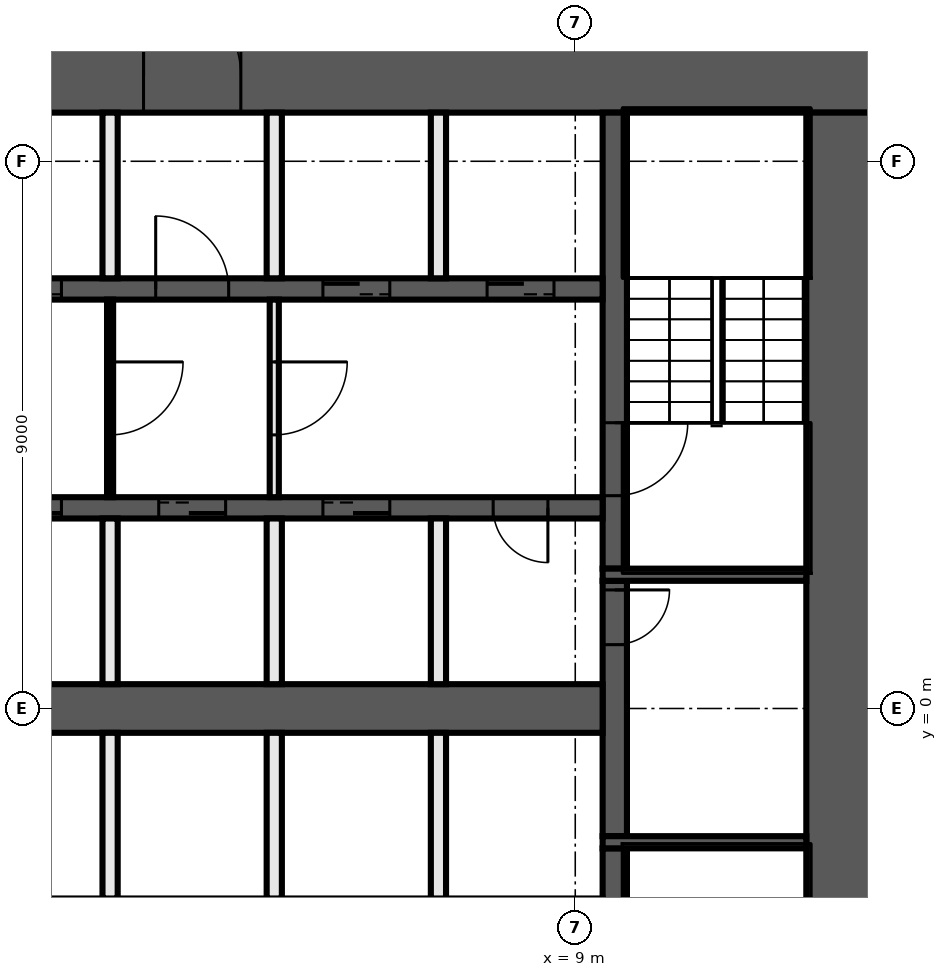
"""IFC4 building model, lengths in metres.
Left out: names, types, materials, properties, quantities, classifications, styles, units other than length and angle.
Written with IfcOpenShell. Run it as: python <this file> out.ifc"""

import sys

from ifc_helpers import new_model, si_unit, direction, frame, frame_2d, origin, place, context, subcontext, project, spatial, rectangle, extrude, element, fill, save


model = new_model("IFC4")
c1 = context("Model", 3, precision=1e-05, world=origin(), true_north=direction((0.0, 1.0)))
c2 = subcontext(c1, "Body", "Model", "MODEL_VIEW")
j1 = project(units=[si_unit("LENGTHUNIT", "METRE"), si_unit("PLANEANGLEUNIT", "RADIAN")], contexts=[c1])
p1 = place(None, origin())
s1 = spatial("IfcSite", under=j1, at=p1, CompositionType="ELEMENT")
p2 = place(p1, origin())
s2 = spatial("IfcBuilding", under=s1, at=p2, CompositionType="ELEMENT")
p3 = place(p2, frame((0.0, 0.0, 19.0)))
s3 = spatial("IfcBuildingStorey", under=s2, at=p3, CompositionType="ELEMENT", Elevation=19.0)
p4 = place(p3, frame((-14.0, 10.4, 0.0), z_axis=(0.0, 0.0, 1.0), x_axis=(1.0, 0.0, 0.0)))
e1 = element("IfcWall", 1, at=p4, inside=s3, PredefinedType="SHEAR", context=c2, shape_type="SweptSolid", body=[
    extrude(rectangle(XDim=28.0, YDim=1.2, at=frame_2d((14.0, 0.0))), origin(), (0.0, 0.0, 1.0), 7.55),
])
p5 = place(p4, frame((15.9, 0.0, 0.0)))
e2 = element("IfcOpeningElement", 2, at=p5, cuts=e1, PredefinedType="OPENING", context=c2, shape_type="SweptSolid", body=[
    extrude(rectangle(XDim=1.6, YDim=2.1, at=frame_2d((0.8, 1.05))), frame((0.0, 0.61, 0.0), z_axis=(0.0, -1.0, 0.0), x_axis=(1.0, 0.0, 0.0)), (0.0, 0.0, 1.0), 1.22),
])
p6 = place(p3, frame((13.4, 9.8, 0.0), z_axis=(0.0, 0.0, 1.0), x_axis=(0.0, -1.0, 0.0)))
e3 = element("IfcWall", 3, at=p6, inside=s3, PredefinedType="SHEAR", context=c2, shape_type="SweptSolid", body=[
    extrude(rectangle(XDim=19.6, YDim=1.2, at=frame_2d((9.8, 0.0))), origin(), (0.0, 0.0, 1.0), 7.55),
])
p7 = place(p3, frame((9.65, -2.3, 0.0), z_axis=(0.0, 0.0, 1.0), x_axis=(0.0, -1.0, 0.0)))
e4 = element("IfcWall", 4, at=p7, inside=s3, PredefinedType="SHEAR", context=c2, shape_type="SweptSolid", body=[
    extrude(rectangle(XDim=7.5, YDim=0.4, at=frame_2d((3.75, 0.0))), origin(), (0.0, 0.0, 1.0), 7.55),
])
p8 = place(p7, frame((1.2, 0.0, 0.0)))
e5 = element("IfcOpeningElement", 5, at=p8, cuts=e4, PredefinedType="OPENING", context=c2, shape_type="SweptSolid", body=[
    extrude(rectangle(XDim=1.2, YDim=2.1, at=frame_2d((0.6, 1.05))), frame((0.0, 0.21, 0.0), z_axis=(0.0, -1.0, 0.0), x_axis=(1.0, 0.0, 0.0)), (0.0, 0.0, 1.0), 0.42),
])
p9 = place(p3, frame((9.65, 2.1, 0.0), z_axis=(0.0, 0.0, 1.0), x_axis=(0.0, -1.0, 0.0)))
e6 = element("IfcWall", 6, at=p9, inside=s3, PredefinedType="SHEAR", context=c2, shape_type="SweptSolid", body=[
    extrude(rectangle(XDim=4.2, YDim=0.4, at=frame_2d((2.1, 0.0))), origin(), (0.0, 0.0, 1.0), 7.55),
])
p10 = place(p9, frame((0.15, 0.0, 0.0)))
e7 = element("IfcOpeningElement", 7, at=p10, cuts=e6, PredefinedType="OPENING", context=c2, shape_type="SweptSolid", body=[
    extrude(rectangle(XDim=0.9, YDim=2.1, at=frame_2d((0.45, 1.05))), frame((0.0, 0.21, 0.0), z_axis=(0.0, -1.0, 0.0), x_axis=(1.0, 0.0, 0.0)), (0.0, 0.0, 1.0), 0.42),
])
p11 = place(p3, frame((9.65, 9.8, 0.0), z_axis=(0.0, 0.0, 1.0), x_axis=(0.0, -1.0, 0.0)))
e8 = element("IfcWall", 8, at=p11, inside=s3, PredefinedType="SHEAR", context=c2, shape_type="SweptSolid", body=[
    extrude(rectangle(XDim=7.5, YDim=0.4, at=frame_2d((3.75, 0.0))), origin(), (0.0, 0.0, 1.0), 7.55),
])
p12 = place(p11, frame((5.1, 0.0, 0.0)))
e9 = element("IfcOpeningElement", 9, at=p12, cuts=e8, PredefinedType="OPENING", context=c2, shape_type="SweptSolid", body=[
    extrude(rectangle(XDim=1.2, YDim=2.1, at=frame_2d((0.6, 1.05))), frame((0.0, 0.21, 0.0), z_axis=(0.0, -1.0, 0.0), x_axis=(1.0, 0.0, 0.0)), (0.0, 0.0, 1.0), 0.42),
])
for number, where, z_axis, x_axis in (
    (10, (9.45, 2.2, 0.0), (0.0, 0.0, 1.0), (1.0, 0.0, 0.0)),
    (11, (9.45, -2.2, 0.0), (0.0, 0.0, 1.0), (1.0, 0.0, 0.0)),
):
    element("IfcWall", number, at=place(p3, frame(where, z_axis=z_axis, x_axis=x_axis)), inside=s3, PredefinedType="SHEAR", context=c2, shape_type="SweptSolid", body=[
        extrude(rectangle(XDim=3.35, YDim=0.2, at=frame_2d((1.675, 0.0))), origin(), (0.0, 0.0, 1.0), 7.55),
    ])
p13 = place(p3, frame((-9.45, 6.9, 0.0), z_axis=(0.0, 0.0, 1.0), x_axis=(1.0, 0.0, 0.0)))
e12 = element("IfcWall", 12, at=p13, inside=s3, PredefinedType="SHEAR", context=c2, shape_type="SweptSolid", body=[
    extrude(rectangle(XDim=18.9, YDim=0.35, at=frame_2d((9.45, 0.0))), origin(), (0.0, 0.0, 1.0), 7.55),
])
p14 = place(p13, frame((0.8, 0.0, 0.0)))
e13 = element("IfcOpeningElement", 13, at=p14, cuts=e12, PredefinedType="OPENING", context=c2, shape_type="SweptSolid", body=[
    extrude(rectangle(XDim=1.1, YDim=2.1, at=frame_2d((0.55, 1.05))), frame((0.0, 0.185, 0.0), z_axis=(0.0, -1.0, 0.0), x_axis=(1.0, 0.0, 0.0)), (0.0, 0.0, 1.0), 0.37),
])
p15 = place(p13, frame((3.5, 0.0, 0.0)))
e14 = element("IfcOpeningElement", 14, at=p15, cuts=e12, PredefinedType="OPENING", context=c2, shape_type="SweptSolid", body=[
    extrude(rectangle(XDim=1.1, YDim=2.1, at=frame_2d((0.55, 1.05))), frame((0.0, 0.185, 0.0), z_axis=(0.0, -1.0, 0.0), x_axis=(1.0, 0.0, 0.0)), (0.0, 0.0, 1.0), 0.37),
])
p16 = place(p13, frame((6.2, 0.0, 0.0)))
e15 = element("IfcOpeningElement", 15, at=p16, cuts=e12, PredefinedType="OPENING", context=c2, shape_type="SweptSolid", body=[
    extrude(rectangle(XDim=1.1, YDim=2.1, at=frame_2d((0.55, 1.05))), frame((0.0, 0.185, 0.0), z_axis=(0.0, -1.0, 0.0), x_axis=(1.0, 0.0, 0.0)), (0.0, 0.0, 1.0), 0.37),
])
p17 = place(p13, frame((8.9, 0.0, 0.0)))
e16 = element("IfcOpeningElement", 16, at=p17, cuts=e12, PredefinedType="OPENING", context=c2, shape_type="SweptSolid", body=[
    extrude(rectangle(XDim=1.1, YDim=2.1, at=frame_2d((0.55, 1.05))), frame((0.0, 0.185, 0.0), z_axis=(0.0, -1.0, 0.0), x_axis=(1.0, 0.0, 0.0)), (0.0, 0.0, 1.0), 0.37),
])
p18 = place(p13, frame((11.55, 0.0, 0.0)))
e17 = element("IfcOpeningElement", 17, at=p18, cuts=e12, PredefinedType="OPENING", context=c2, shape_type="SweptSolid", body=[
    extrude(rectangle(XDim=1.2, YDim=2.1, at=frame_2d((0.6, 1.05))), frame((0.0, 0.185, 0.0), z_axis=(0.0, -1.0, 0.0), x_axis=(1.0, 0.0, 0.0)), (0.0, 0.0, 1.0), 0.37),
])
p19 = place(p13, frame((14.3, 0.0, 0.0)))
e18 = element("IfcOpeningElement", 18, at=p19, cuts=e12, PredefinedType="OPENING", context=c2, shape_type="SweptSolid", body=[
    extrude(rectangle(XDim=1.1, YDim=2.1, at=frame_2d((0.55, 1.05))), frame((0.0, 0.185, 0.0), z_axis=(0.0, -1.0, 0.0), x_axis=(1.0, 0.0, 0.0)), (0.0, 0.0, 1.0), 0.37),
])
p20 = place(p13, frame((17.0, 0.0, 0.0)))
e19 = element("IfcOpeningElement", 19, at=p20, cuts=e12, PredefinedType="OPENING", context=c2, shape_type="SweptSolid", body=[
    extrude(rectangle(XDim=1.1, YDim=2.1, at=frame_2d((0.55, 1.05))), frame((0.0, 0.185, 0.0), z_axis=(0.0, -1.0, 0.0), x_axis=(1.0, 0.0, 0.0)), (0.0, 0.0, 1.0), 0.37),
])
p21 = place(p3, frame((9.45, 3.3, 0.0), z_axis=(0.0, 0.0, 1.0), x_axis=(-1.0, 0.0, 0.0)))
e20 = element("IfcWall", 20, at=p21, inside=s3, PredefinedType="SHEAR", context=c2, shape_type="SweptSolid", body=[
    extrude(rectangle(XDim=18.9, YDim=0.35, at=frame_2d((9.45, 0.0))), origin(), (0.0, 0.0, 1.0), 7.55),
])
p22 = place(p21, frame((17.0, 0.0, 0.0)))
e21 = element("IfcOpeningElement", 21, at=p22, cuts=e20, PredefinedType="OPENING", context=c2, shape_type="SweptSolid", body=[
    extrude(rectangle(XDim=1.1, YDim=2.1, at=frame_2d((0.55, 1.05))), frame((0.0, 0.185, 0.0), z_axis=(0.0, -1.0, 0.0), x_axis=(1.0, 0.0, 0.0)), (0.0, 0.0, 1.0), 0.37),
])
p23 = place(p21, frame((14.3, 0.0, 0.0)))
e22 = element("IfcOpeningElement", 22, at=p23, cuts=e20, PredefinedType="OPENING", context=c2, shape_type="SweptSolid", body=[
    extrude(rectangle(XDim=1.1, YDim=2.1, at=frame_2d((0.55, 1.05))), frame((0.0, 0.185, 0.0), z_axis=(0.0, -1.0, 0.0), x_axis=(1.0, 0.0, 0.0)), (0.0, 0.0, 1.0), 0.37),
])
p24 = place(p21, frame((11.6, 0.0, 0.0)))
e23 = element("IfcOpeningElement", 23, at=p24, cuts=e20, PredefinedType="OPENING", context=c2, shape_type="SweptSolid", body=[
    extrude(rectangle(XDim=1.1, YDim=2.1, at=frame_2d((0.55, 1.05))), frame((0.0, 0.185, 0.0), z_axis=(0.0, -1.0, 0.0), x_axis=(1.0, 0.0, 0.0)), (0.0, 0.0, 1.0), 0.37),
])
p25 = place(p21, frame((8.9, 0.0, 0.0)))
e24 = element("IfcOpeningElement", 24, at=p25, cuts=e20, PredefinedType="OPENING", context=c2, shape_type="SweptSolid", body=[
    extrude(rectangle(XDim=1.1, YDim=2.1, at=frame_2d((0.55, 1.05))), frame((0.0, 0.185, 0.0), z_axis=(0.0, -1.0, 0.0), x_axis=(1.0, 0.0, 0.0)), (0.0, 0.0, 1.0), 0.37),
])
p26 = place(p21, frame((6.2, 0.0, 0.0)))
e25 = element("IfcOpeningElement", 25, at=p26, cuts=e20, PredefinedType="OPENING", context=c2, shape_type="SweptSolid", body=[
    extrude(rectangle(XDim=1.1, YDim=2.1, at=frame_2d((0.55, 1.05))), frame((0.0, 0.185, 0.0), z_axis=(0.0, -1.0, 0.0), x_axis=(1.0, 0.0, 0.0)), (0.0, 0.0, 1.0), 0.37),
])
p27 = place(p21, frame((3.5, 0.0, 0.0)))
e26 = element("IfcOpeningElement", 26, at=p27, cuts=e20, PredefinedType="OPENING", context=c2, shape_type="SweptSolid", body=[
    extrude(rectangle(XDim=1.1, YDim=2.1, at=frame_2d((0.55, 1.05))), frame((0.0, 0.185, 0.0), z_axis=(0.0, -1.0, 0.0), x_axis=(1.0, 0.0, 0.0)), (0.0, 0.0, 1.0), 0.37),
])
p28 = place(p21, frame((0.9, 0.0, 0.0)))
e27 = element("IfcOpeningElement", 27, at=p28, cuts=e20, PredefinedType="OPENING", context=c2, shape_type="SweptSolid", body=[
    extrude(rectangle(XDim=0.9, YDim=2.1, at=frame_2d((0.45, 1.05))), frame((0.0, 0.185, 0.0), z_axis=(0.0, -1.0, 0.0), x_axis=(1.0, 0.0, 0.0)), (0.0, 0.0, 1.0), 0.37),
])
p29 = place(p3, frame((-9.45, 0.0, 0.0), z_axis=(0.0, 0.0, 1.0), x_axis=(1.0, 0.0, 0.0)))
e28 = element("IfcWall", 28, at=p29, inside=s3, PredefinedType="SHEAR", context=c2, shape_type="SweptSolid", body=[
    extrude(rectangle(XDim=18.9, YDim=0.8, at=frame_2d((9.45, 0.0))), origin(), (0.0, 0.0, 1.0), 7.55),
])
for number, where, z_axis, x_axis in (
    (29, (6.75, -3.125, 0.0), (0.0, 0.0, 1.0), (0.0, 1.0, 0.0)),
    (30, (6.75, 0.4, 0.0), (0.0, 0.0, 1.0), (0.0, 1.0, 0.0)),
    (31, (6.75, 7.075, 0.0), (0.0, 0.0, 1.0), (0.0, 1.0, 0.0)),
):
    element("IfcWall", number, at=place(p3, frame(where, z_axis=z_axis, x_axis=x_axis)), inside=s3, PredefinedType="SOLIDWALL", context=c2, shape_type="SweptSolid", body=[
        extrude(rectangle(XDim=2.725, YDim=0.25, at=frame_2d((1.363, 0.0))), origin(), (0.0, 0.0, 1.0), 7.55),
    ])
p30 = place(p3, frame((4.05, 6.725, 0.0), z_axis=(0.0, 0.0, 1.0), x_axis=(0.0, -1.0, 0.0)))
e32 = element("IfcWall", 32, at=p30, inside=s3, PredefinedType="PARTITIONING", context=c2, shape_type="SweptSolid", body=[
    extrude(rectangle(XDim=3.25, YDim=0.15, at=frame_2d((1.625, 0.0))), origin(), (0.0, 0.0, 1.0), 7.55),
])
p31 = place(p30, frame((1.025, 0.0, 0.0)))
e33 = element("IfcOpeningElement", 33, at=p31, cuts=e32, PredefinedType="OPENING", context=c2, shape_type="SweptSolid", body=[
    extrude(rectangle(XDim=1.2, YDim=2.1, at=frame_2d((0.6, 1.05))), frame((0.0, 0.085, 0.0), z_axis=(0.0, -1.0, 0.0), x_axis=(1.0, 0.0, 0.0)), (0.0, 0.0, 1.0), 0.17),
])
for number, where, z_axis, x_axis in (
    (34, (4.05, -3.125, 0.0), (0.0, 0.0, 1.0), (0.0, 1.0, 0.0)),
    (35, (4.05, 0.4, 0.0), (0.0, 0.0, 1.0), (0.0, 1.0, 0.0)),
    (36, (4.05, 7.075, 0.0), (0.0, 0.0, 1.0), (0.0, 1.0, 0.0)),
):
    element("IfcWall", number, at=place(p3, frame(where, z_axis=z_axis, x_axis=x_axis)), inside=s3, PredefinedType="SOLIDWALL", context=c2, shape_type="SweptSolid", body=[
        extrude(rectangle(XDim=2.725, YDim=0.25, at=frame_2d((1.363, 0.0))), origin(), (0.0, 0.0, 1.0), 7.55),
    ])
p32 = place(p3, frame((1.35, 6.725, 0.0), z_axis=(0.0, 0.0, 1.0), x_axis=(0.0, -1.0, 0.0)))
e37 = element("IfcWall", 37, at=p32, inside=s3, PredefinedType="PARTITIONING", context=c2, shape_type="SweptSolid", body=[
    extrude(rectangle(XDim=3.25, YDim=0.1, at=frame_2d((1.625, 0.0))), origin(), (0.0, 0.0, 1.0), 7.55),
])
p33 = place(p32, frame((1.025, 0.0, 0.0)))
e38 = element("IfcOpeningElement", 38, at=p33, cuts=e37, PredefinedType="OPENING", context=c2, shape_type="SweptSolid", body=[
    extrude(rectangle(XDim=1.2, YDim=2.1, at=frame_2d((0.6, 1.05))), frame((0.0, 0.06, 0.0), z_axis=(0.0, -1.0, 0.0), x_axis=(1.0, 0.0, 0.0)), (0.0, 0.0, 1.0), 0.12),
])
for number, where, z_axis, x_axis in (
    (39, (1.35, -3.125, 0.0), (0.0, 0.0, 1.0), (0.0, 1.0, 0.0)),
    (40, (1.35, 0.4, 0.0), (0.0, 0.0, 1.0), (0.0, 1.0, 0.0)),
    (41, (1.35, 7.075, 0.0), (0.0, 0.0, 1.0), (0.0, 1.0, 0.0)),
):
    element("IfcWall", number, at=place(p3, frame(where, z_axis=z_axis, x_axis=x_axis)), inside=s3, PredefinedType="SOLIDWALL", context=c2, shape_type="SweptSolid", body=[
        extrude(rectangle(XDim=2.725, YDim=0.25, at=frame_2d((1.363, 0.0))), origin(), (0.0, 0.0, 1.0), 7.55),
    ])
p34 = place(p10, origin())
e42 = element("IfcDoor", 42, at=p34, inside=s3, OperationType="SINGLE_SWING_RIGHT", PredefinedType="DOOR", context=c2, shape_type="SweptSolid", body=[
    extrude(rectangle(XDim=0.9, YDim=2.1, at=frame_2d((0.45, 1.05))), frame((0.0, 0.025, 0.0), z_axis=(0.0, -1.0, 0.0), x_axis=(1.0, 0.0, 0.0)), (0.0, 0.0, 1.0), 0.05),
])
fill(e7, e42)
p35 = place(p17, origin())
e43 = element("IfcDoor", 43, at=p35, inside=s3, OperationType="DOUBLE_DOOR_SLIDING", PredefinedType="DOOR", context=c2, shape_type="SweptSolid", body=[
    extrude(rectangle(XDim=1.1, YDim=2.1, at=frame_2d((0.55, 1.05))), frame((0.0, 0.025, 0.0), z_axis=(0.0, -1.0, 0.0), x_axis=(1.0, 0.0, 0.0)), (0.0, 0.0, 1.0), 0.05),
])
fill(e16, e43)
p36 = place(p5, origin())
e44 = element("IfcDoor", 44, at=p36, inside=s3, OperationType="DOUBLE_DOOR_SINGLE_SWING", PredefinedType="DOOR", context=c2, shape_type="SweptSolid", body=[
    extrude(rectangle(XDim=1.6, YDim=2.1, at=frame_2d((0.8, 1.05))), frame((0.0, 0.025, 0.0), z_axis=(0.0, -1.0, 0.0), x_axis=(1.0, 0.0, 0.0)), (0.0, 0.0, 1.0), 0.05),
])
fill(e2, e44)
p37 = place(p18, origin())
e45 = element("IfcDoor", 45, at=p37, inside=s3, OperationType="SINGLE_SWING_LEFT", PredefinedType="DOOR", context=c2, shape_type="SweptSolid", body=[
    extrude(rectangle(XDim=1.2, YDim=2.1, at=frame_2d((0.6, 1.05))), frame((0.0, 0.025, 0.0), z_axis=(0.0, -1.0, 0.0), x_axis=(1.0, 0.0, 0.0)), (0.0, 0.0, 1.0), 0.05),
])
fill(e17, e45)
p38 = place(p19, origin())
e46 = element("IfcDoor", 46, at=p38, inside=s3, OperationType="DOUBLE_DOOR_SLIDING", PredefinedType="DOOR", context=c2, shape_type="SweptSolid", body=[
    extrude(rectangle(XDim=1.1, YDim=2.1, at=frame_2d((0.55, 1.05))), frame((0.0, 0.025, 0.0), z_axis=(0.0, -1.0, 0.0), x_axis=(1.0, 0.0, 0.0)), (0.0, 0.0, 1.0), 0.05),
])
fill(e18, e46)
p39 = place(p20, origin())
e47 = element("IfcDoor", 47, at=p39, inside=s3, OperationType="DOUBLE_DOOR_SLIDING", PredefinedType="DOOR", context=c2, shape_type="SweptSolid", body=[
    extrude(rectangle(XDim=1.1, YDim=2.1, at=frame_2d((0.55, 1.05))), frame((0.0, 0.025, 0.0), z_axis=(0.0, -1.0, 0.0), x_axis=(1.0, 0.0, 0.0)), (0.0, 0.0, 1.0), 0.05),
])
fill(e19, e47)
p40 = place(p25, origin())
e48 = element("IfcDoor", 48, at=p40, inside=s3, OperationType="DOUBLE_DOOR_SLIDING", PredefinedType="DOOR", context=c2, shape_type="SweptSolid", body=[
    extrude(rectangle(XDim=1.1, YDim=2.1, at=frame_2d((0.55, 1.05))), frame((0.0, 0.025, 0.0), z_axis=(0.0, -1.0, 0.0), x_axis=(1.0, 0.0, 0.0)), (0.0, 0.0, 1.0), 0.05),
])
fill(e24, e48)
p41 = place(p26, origin())
e49 = element("IfcDoor", 49, at=p41, inside=s3, OperationType="DOUBLE_DOOR_SLIDING", PredefinedType="DOOR", context=c2, shape_type="SweptSolid", body=[
    extrude(rectangle(XDim=1.1, YDim=2.1, at=frame_2d((0.55, 1.05))), frame((0.0, 0.025, 0.0), z_axis=(0.0, -1.0, 0.0), x_axis=(1.0, 0.0, 0.0)), (0.0, 0.0, 1.0), 0.05),
])
fill(e25, e49)
p42 = place(p27, origin())
e50 = element("IfcDoor", 50, at=p42, inside=s3, OperationType="DOUBLE_DOOR_SLIDING", PredefinedType="DOOR", context=c2, shape_type="SweptSolid", body=[
    extrude(rectangle(XDim=1.1, YDim=2.1, at=frame_2d((0.55, 1.05))), frame((0.0, 0.025, 0.0), z_axis=(0.0, -1.0, 0.0), x_axis=(1.0, 0.0, 0.0)), (0.0, 0.0, 1.0), 0.05),
])
fill(e26, e50)
p43 = place(p28, origin())
e51 = element("IfcDoor", 51, at=p43, inside=s3, OperationType="SINGLE_SWING_LEFT", PredefinedType="DOOR", context=c2, shape_type="SweptSolid", body=[
    extrude(rectangle(XDim=0.9, YDim=2.1, at=frame_2d((0.45, 1.05))), frame((0.0, 0.025, 0.0), z_axis=(0.0, -1.0, 0.0), x_axis=(1.0, 0.0, 0.0)), (0.0, 0.0, 1.0), 0.05),
])
fill(e27, e51)
p44 = place(p12, origin())
e52 = element("IfcDoor", 52, at=p44, inside=s3, OperationType="SINGLE_SWING_LEFT", PredefinedType="DOOR", context=c2, shape_type="SweptSolid", body=[
    extrude(rectangle(XDim=1.2, YDim=2.1, at=frame_2d((0.6, 1.05))), frame((0.0, 0.025, 0.0), z_axis=(0.0, -1.0, 0.0), x_axis=(1.0, 0.0, 0.0)), (0.0, 0.0, 1.0), 0.05),
])
fill(e9, e52)
p45 = place(p33, origin())
e53 = element("IfcDoor", 53, at=p45, inside=s3, OperationType="SINGLE_SWING_LEFT", PredefinedType="DOOR", context=c2, shape_type="SweptSolid", body=[
    extrude(rectangle(XDim=1.2, YDim=2.1, at=frame_2d((0.6, 1.05))), frame((0.0, 0.025, 0.0), z_axis=(0.0, -1.0, 0.0), x_axis=(1.0, 0.0, 0.0)), (0.0, 0.0, 1.0), 0.05),
])
fill(e38, e53)
p46 = place(p31, origin())
e54 = element("IfcDoor", 54, at=p46, inside=s3, OperationType="SINGLE_SWING_RIGHT", PredefinedType="DOOR", context=c2, shape_type="SweptSolid", body=[
    extrude(rectangle(XDim=1.2, YDim=2.1, at=frame_2d((0.6, 1.05))), frame((0.0, 0.025, 0.0), z_axis=(0.0, -1.0, 0.0), x_axis=(1.0, 0.0, 0.0)), (0.0, 0.0, 1.0), 0.05),
])
fill(e33, e54)
save(model, sys.argv[1])
